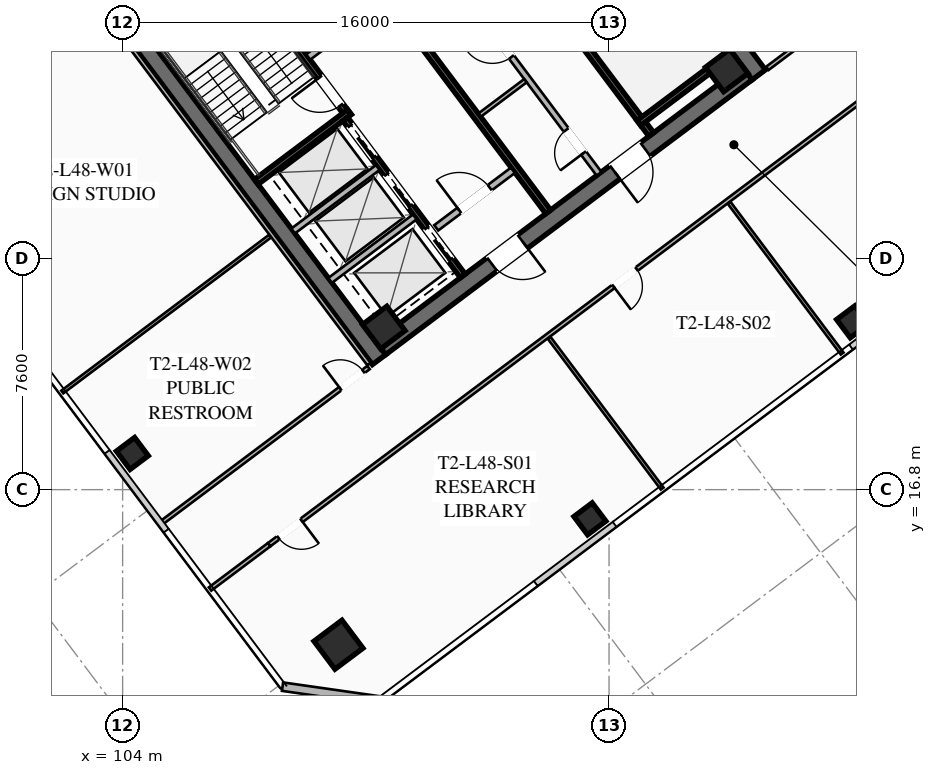
"""IFC4 building model, lengths in metres.
Left out: names, types, materials, properties, quantities, classifications, styles, units other than length and angle.
Written with IfcOpenShell. Run it as: python <this file> out.ifc"""

import sys

from ifc_helpers import new_model, si_unit, direction, frame, frame_2d, origin, origin_2d, place, context, subcontext, project, spatial, rectangle, hollow_rectangle, extrude, element, fill, save


model = new_model("IFC4")
c1 = context("Model", 3, precision=1e-05, world=origin(), true_north=direction((0.0, 1.0)))
c2 = subcontext(c1, "Body", "Model", "MODEL_VIEW")
j1 = project(units=[si_unit("LENGTHUNIT", "METRE"), si_unit("PLANEANGLEUNIT", "RADIAN")], contexts=[c1])
p1 = place(None, origin())
s1 = spatial("IfcSite", under=j1, at=p1, CompositionType="ELEMENT")
p2 = place(p1, origin())
s2 = spatial("IfcBuilding", under=s1, at=p2, CompositionType="ELEMENT")
p3 = place(p2, frame((0.0, 0.0, 178.3)))
s3 = spatial("IfcBuildingStorey", under=s2, at=p3, CompositionType="ELEMENT", Elevation=178.3)
for number, where, z_axis, x_axis in (
    (1, (112.436, 21.077, 0.0), (0.0, 0.0, 1.0), (-0.6, 0.8, 0.0)),
    (2, (115.564, 42.923, 0.0), (0.0, 0.0, 1.0), (0.6, -0.8, 0.0)),
):
    element("IfcWall", number, at=place(p3, frame(where, z_axis=z_axis, x_axis=x_axis)), inside=s3, PredefinedType="SHEAR", context=c2, shape_type="SweptSolid", body=[
        extrude(rectangle(XDim=15.6, YDim=0.55, at=frame_2d((7.8, 0.0))), origin(), (0.0, 0.0, 1.0), 3.55),
    ])
p4 = place(p3, frame((124.539, 30.498, 0.0), z_axis=(0.0, 0.0, 1.0), x_axis=(-0.799998054672, -0.600002593761, 0.0)))
e3 = element("IfcWall", 3, at=p4, inside=s3, PredefinedType="SHEAR", context=c2, shape_type="SweptSolid", body=[
    extrude(rectangle(XDim=15.06, YDim=0.55, at=frame_2d((7.53, 0.0))), origin(), (0.0, 0.0, 1.0), 3.55),
])
p5 = place(p4, frame((9.23, 0.0, 0.0)))
e4 = element("IfcOpeningElement", 4, at=p5, cuts=e3, PredefinedType="OPENING", context=c2, shape_type="SweptSolid", body=[
    extrude(rectangle(XDim=1.25, YDim=2.25, at=frame_2d((0.625, 1.125))), frame((0.0, 0.285, 0.0), z_axis=(0.0, -1.0, 0.0), x_axis=(1.0, 0.0, 0.0)), (0.0, 0.0, 1.0), 0.57),
])
p6 = place(p4, frame((4.18, 0.0, 0.0)))
e5 = element("IfcOpeningElement", 5, at=p6, cuts=e3, PredefinedType="OPENING", context=c2, shape_type="SweptSolid", body=[
    extrude(rectangle(XDim=1.25, YDim=2.25, at=frame_2d((0.625, 1.125))), frame((0.0, 0.285, 0.0), z_axis=(0.0, -1.0, 0.0), x_axis=(1.0, 0.0, 0.0)), (0.0, 0.0, 1.0), 0.57),
])
for number, where, z_axis, x_axis in (
    (6, (112.59, 22.13, 0.0), (0.0, 0.0, 1.0), (0.8, 0.6, 0.0)),
    (7, (123.87, 30.59, 0.0), (0.0, 0.0, 1.0), (0.8, 0.6, 0.0)),
):
    element("IfcColumn", number, at=place(p3, frame(where, z_axis=z_axis, x_axis=x_axis)), inside=s3, PredefinedType="COLUMN", context=c2, shape_type="SweptSolid", body=[
        extrude(hollow_rectangle(XDim=1.0, YDim=1.0, WallThickness=0.04, at=origin_2d()), origin(), (0.0, 0.0, 1.0), 3.37),
    ])
p7 = place(p3, frame((111.1, 11.7, 0.0), z_axis=(0.0, 0.0, 1.0), x_axis=(0.799999996291, 0.600000004945, 0.0)))
e8 = element("IfcColumn", 8, at=p7, inside=s3, PredefinedType="COLUMN", context=c2, shape_type="SweptSolid", body=[
    extrude(hollow_rectangle(XDim=1.15, YDim=1.15, WallThickness=0.045, at=origin_2d()), origin(), (0.0, 0.0, 1.0), 3.37),
])
for number, where, z_axis, x_axis in (
    (9, (119.37, 15.84, 0.0), (0.0, 0.0, 1.0), (0.8, 0.6, 0.0)),
    (10, (128.01, 22.32, 0.0), (0.0, 0.0, 1.0), (0.8, 0.6, 0.0)),
    (11, (104.32, 17.99, 0.0), (0.0, 0.0, 1.0), (0.8, 0.6, 0.0)),
):
    element("IfcColumn", number, at=place(p3, frame(where, z_axis=z_axis, x_axis=x_axis)), inside=s3, PredefinedType="COLUMN", context=c2, shape_type="SweptSolid", body=[
        extrude(hollow_rectangle(XDim=0.75, YDim=0.75, WallThickness=0.032, at=origin_2d()), origin(), (0.0, 0.0, 1.0), 3.37),
    ])
p8 = place(p3, frame((112.48, 9.86, 0.0), z_axis=(0.0, 0.0, 1.0), x_axis=(-0.989950994782, 0.141410847992, 0.0)))
e12 = element("IfcWall", 12, at=p8, inside=s3, PredefinedType="SOLIDWALL", context=c2, shape_type="SweptSolid", body=[
    extrude(rectangle(XDim=3.253, YDim=0.28, at=frame_2d((1.626, 0.0))), origin(), (0.0, 0.0, 1.0), 3.37),
])
p9 = place(p3, frame((111.44, 29.08, 0.0), z_axis=(0.0, 0.0, 1.0), x_axis=(-0.59999029481, 0.8000072788, 0.0)))
e13 = element("IfcWall", 13, at=p9, inside=s3, PredefinedType="SHEAR", context=c2, shape_type="SweptSolid", body=[
    extrude(rectangle(XDim=8.05, YDim=0.2, at=frame_2d((4.025, 0.0))), origin(), (0.0, 0.0, 1.0), 3.37),
])
p10 = place(p9, frame((0.45, 0.0, 0.0)))
e14 = element("IfcOpeningElement", 14, at=p10, cuts=e13, PredefinedType="OPENING", context=c2, shape_type="SweptSolid", body=[
    extrude(rectangle(XDim=1.15, YDim=2.2, at=frame_2d((0.575, 1.1))), frame((0.0, 0.11, 0.0), z_axis=(0.0, -1.0, 0.0), x_axis=(1.0, 0.0, 0.0)), (0.0, 0.0, 1.0), 0.22),
])
p11 = place(p3, frame((108.396, 26.922, 0.0), z_axis=(0.0, 0.0, 1.0), x_axis=(0.800015298837, 0.599979601008, 0.0)))
e15 = element("IfcWall", 15, at=p11, inside=s3, PredefinedType="SHEAR", context=c2, shape_type="SweptSolid", body=[
    extrude(rectangle(XDim=3.83, YDim=0.2, at=frame_2d((1.915, 0.0))), origin(), (0.0, 0.0, 1.0), 3.37),
])
p12 = place(p3, frame((116.56, 34.92, 0.0), z_axis=(0.0, 0.0, 1.0), x_axis=(0.59999029481, -0.8000072788, 0.0)))
e16 = element("IfcWall", 16, at=p12, inside=s3, PredefinedType="SHEAR", context=c2, shape_type="SweptSolid", body=[
    extrude(rectangle(XDim=8.05, YDim=0.2, at=frame_2d((4.025, 0.0))), origin(), (0.0, 0.0, 1.0), 3.37),
])
p13 = place(p12, frame((0.45, 0.0, 0.0)))
e17 = element("IfcOpeningElement", 17, at=p13, cuts=e16, PredefinedType="OPENING", context=c2, shape_type="SweptSolid", body=[
    extrude(rectangle(XDim=1.15, YDim=2.2, at=frame_2d((0.575, 1.1))), frame((0.0, 0.11, 0.0), z_axis=(0.0, -1.0, 0.0), x_axis=(1.0, 0.0, 0.0)), (0.0, 0.0, 1.0), 0.22),
])
p14 = place(p3, frame((120.98, 28.86, 0.0), z_axis=(0.0, 0.0, 1.0), x_axis=(0.800015298837, 0.599979601008, 0.0)))
e18 = element("IfcWall", 18, at=p14, inside=s3, PredefinedType="SHEAR", context=c2, shape_type="SweptSolid", body=[
    extrude(rectangle(XDim=3.83, YDim=0.2, at=frame_2d((1.915, 0.0))), origin(), (0.0, 0.0, 1.0), 3.37),
])
p15 = place(p3, frame((117.998, 25.936, 0.0), z_axis=(0.0, 0.0, 1.0), x_axis=(-0.600002693989, 0.799997979501, 0.0)))
e19 = element("IfcWall", 19, at=p15, inside=s3, PredefinedType="SHEAR", context=c2, shape_type="SweptSolid", body=[
    extrude(rectangle(XDim=14.5, YDim=0.2, at=frame_2d((7.25, 0.0))), origin(), (0.0, 0.0, 1.0), 3.37),
])
p16 = place(p3, frame((110.104, 31.028, 0.0), z_axis=(0.0, 0.0, 1.0), x_axis=(0.800018601094, 0.59997519774, 0.0)))
e20 = element("IfcWall", 20, at=p16, inside=s3, PredefinedType="SOLIDWALL", context=c2, shape_type="SweptSolid", body=[
    extrude(rectangle(XDim=3.15, YDim=0.22, at=frame_2d((1.575, 0.0))), origin(), (0.0, 0.0, 1.0), 2.723),
])
p17 = place(p3, frame((114.316, 25.412, 0.0), z_axis=(0.0, 0.0, 1.0), x_axis=(0.800018601094, 0.59997519774, 0.0)))
e21 = element("IfcWall", 21, at=p17, inside=s3, PredefinedType="SOLIDWALL", context=c2, shape_type="SweptSolid", body=[
    extrude(rectangle(XDim=3.15, YDim=0.22, at=frame_2d((1.575, 0.0))), origin(), (0.0, 0.0, 1.0), 2.723),
])
p18 = place(p17, frame((0.95, 0.0, 0.0)))
e22 = element("IfcOpeningElement", 22, at=p18, cuts=e21, PredefinedType="OPENING", context=c2, shape_type="SweptSolid", body=[
    extrude(rectangle(XDim=1.25, YDim=2.25, at=frame_2d((0.625, 1.125))), frame((0.0, 0.12, 0.0), z_axis=(0.0, -1.0, 0.0), x_axis=(1.0, 0.0, 0.0)), (0.0, 0.0, 1.0), 0.24),
])
p19 = place(p3, frame((115.19, 23.83, 0.0), z_axis=(0.0, 0.0, 1.0), x_axis=(-0.599993943644, 0.800004542231, 0.0)))
e23 = element("IfcWall", 23, at=p19, inside=s3, PredefinedType="SHEAR", context=c2, shape_type="SweptSolid", body=[
    extrude(rectangle(XDim=6.45, YDim=0.2, at=frame_2d((3.225, 0.0))), origin(), (0.0, 0.0, 1.0), 3.37),
])
p20 = place(p19, frame((4.875, 0.0, 0.0)))
e24 = element("IfcOpeningElement", 24, at=p20, cuts=e23, PredefinedType="OPENING", context=c2, shape_type="SweptSolid", body=[
    extrude(rectangle(XDim=1.3, YDim=2.25, at=frame_2d((0.65, 1.125))), frame((0.0, 0.11, 0.0), z_axis=(0.0, -1.0, 0.0), x_axis=(1.0, 0.0, 0.0)), (0.0, 0.0, 1.0), 0.22),
])
p21 = place(p19, frame((2.875, 0.0, 0.0)))
e25 = element("IfcOpeningElement", 25, at=p21, cuts=e23, PredefinedType="OPENING", context=c2, shape_type="SweptSolid", body=[
    extrude(rectangle(XDim=1.3, YDim=2.25, at=frame_2d((0.65, 1.125))), frame((0.0, 0.11, 0.0), z_axis=(0.0, -1.0, 0.0), x_axis=(1.0, 0.0, 0.0)), (0.0, 0.0, 1.0), 0.22),
])
p22 = place(p19, frame((0.675, 0.0, 0.0)))
e26 = element("IfcOpeningElement", 26, at=p22, cuts=e23, PredefinedType="OPENING", context=c2, shape_type="SweptSolid", body=[
    extrude(rectangle(XDim=1.3, YDim=2.25, at=frame_2d((0.65, 1.125))), frame((0.0, 0.11, 0.0), z_axis=(0.0, -1.0, 0.0), x_axis=(1.0, 0.0, 0.0)), (0.0, 0.0, 1.0), 0.22),
])
for number, where, z_axis, x_axis in (
    (27, (110.826, 23.682, 0.0), (0.0, 0.0, 1.0), (0.8, 0.6, 0.0)),
    (28, (109.608, 25.306, 0.0), (0.0, 0.0, 1.0), (0.8, 0.6, 0.0)),
):
    element("IfcWall", number, at=place(p3, frame(where, z_axis=z_axis, x_axis=x_axis)), inside=s3, PredefinedType="SOLIDWALL", context=c2, shape_type="SweptSolid", body=[
        extrude(rectangle(XDim=3.48, YDim=0.2, at=frame_2d((1.74, 0.0))), origin(), (0.0, 0.0, 1.0), 3.37),
    ])
p23 = place(p3, frame((119.67, 27.19, 0.0), z_axis=(0.0, 0.0, 1.0), x_axis=(-0.599988677396, 0.800008491828, 0.0)))
e29 = element("IfcWall", 29, at=p23, inside=s3, PredefinedType="SOLIDWALL", context=c2, shape_type="SweptSolid", body=[
    extrude(rectangle(XDim=6.9, YDim=0.2, at=frame_2d((3.45, 0.0))), origin(), (0.0, 0.0, 1.0), 2.723),
])
p24 = place(p23, frame((0.85, 0.0, 0.0)))
e30 = element("IfcOpeningElement", 30, at=p24, cuts=e29, PredefinedType="OPENING", context=c2, shape_type="SweptSolid", body=[
    extrude(rectangle(XDim=0.95, YDim=2.05, at=frame_2d((0.475, 1.025))), frame((0.0, 0.11, 0.0), z_axis=(0.0, -1.0, 0.0), x_axis=(1.0, 0.0, 0.0)), (0.0, 0.0, 1.0), 0.22),
])
p25 = place(p23, frame((4.8, 0.0, 0.0)))
e31 = element("IfcOpeningElement", 31, at=p25, cuts=e29, PredefinedType="OPENING", context=c2, shape_type="SweptSolid", body=[
    extrude(rectangle(XDim=1.05, YDim=2.2, at=frame_2d((0.525, 1.1))), frame((0.0, 0.11, 0.0), z_axis=(0.0, -1.0, 0.0), x_axis=(1.0, 0.0, 0.0)), (0.0, 0.0, 1.0), 0.22),
])
p26 = place(p3, frame((115.746, 29.122, 0.0), z_axis=(0.0, 0.0, 1.0), x_axis=(0.8, 0.6, 0.0)))
e32 = element("IfcWall", 32, at=p26, inside=s3, PredefinedType="PARTITIONING", context=c2, shape_type="SweptSolid", body=[
    extrude(rectangle(XDim=1.88, YDim=0.135, at=frame_2d((0.94, 0.0))), origin(), (0.0, 0.0, 1.0), 2.723),
])
p27 = place(p3, frame((96.658, 31.206, 0.0), z_axis=(0.0, 0.0, 1.0), x_axis=(0.8, 0.6, 0.0)))
e33 = element("IfcWall", 33, at=p27, inside=s3, PredefinedType="PARTITIONING", context=c2, shape_type="SweptSolid", body=[
    extrude(rectangle(XDim=28.7, YDim=0.135, at=frame_2d((14.35, 0.0))), origin(), (0.0, 0.0, 1.0), 2.723),
])
p28 = place(p27, frame((0.3, 0.0, 0.0)))
e34 = element("IfcOpeningElement", 34, at=p28, cuts=e33, PredefinedType="OPENING", context=c2, shape_type="SweptSolid", body=[
    extrude(rectangle(XDim=0.95, YDim=2.05, at=frame_2d((0.475, 1.025))), frame((0.0, 0.077, 0.0), z_axis=(0.0, -1.0, 0.0), x_axis=(1.0, 0.0, 0.0)), (0.0, 0.0, 1.0), 0.155),
])
p29 = place(p27, frame((9.959, 0.0, 0.0)))
e35 = element("IfcOpeningElement", 35, at=p29, cuts=e33, PredefinedType="OPENING", context=c2, shape_type="SweptSolid", body=[
    extrude(rectangle(XDim=0.95, YDim=2.05, at=frame_2d((0.475, 1.025))), frame((0.0, 0.077, 0.0), z_axis=(0.0, -1.0, 0.0), x_axis=(1.0, 0.0, 0.0)), (0.0, 0.0, 1.0), 0.155),
])
p30 = place(p27, frame((14.005, 0.0, 0.0)))
e36 = element("IfcOpeningElement", 36, at=p30, cuts=e33, PredefinedType="OPENING", context=c2, shape_type="SweptSolid", body=[
    extrude(rectangle(XDim=0.95, YDim=2.05, at=frame_2d((0.475, 1.025))), frame((0.0, 0.077, 0.0), z_axis=(0.0, -1.0, 0.0), x_axis=(1.0, 0.0, 0.0)), (0.0, 0.0, 1.0), 0.155),
])
p31 = place(p27, frame((18.049, 0.0, 0.0)))
e37 = element("IfcOpeningElement", 37, at=p31, cuts=e33, PredefinedType="OPENING", context=c2, shape_type="SweptSolid", body=[
    extrude(rectangle(XDim=0.95, YDim=2.05, at=frame_2d((0.475, 1.025))), frame((0.0, 0.077, 0.0), z_axis=(0.0, -1.0, 0.0), x_axis=(1.0, 0.0, 0.0)), (0.0, 0.0, 1.0), 0.155),
])
p32 = place(p27, frame((27.45, 0.0, 0.0)))
e38 = element("IfcOpeningElement", 38, at=p32, cuts=e33, PredefinedType="OPENING", context=c2, shape_type="SweptSolid", body=[
    extrude(rectangle(XDim=0.95, YDim=2.05, at=frame_2d((0.475, 1.025))), frame((0.0, 0.077, 0.0), z_axis=(0.0, -1.0, 0.0), x_axis=(1.0, 0.0, 0.0)), (0.0, 0.0, 1.0), 0.155),
])
p33 = place(p3, frame((131.78, 32.21, 0.0), z_axis=(0.0, 0.0, 1.0), x_axis=(-0.8, -0.6, 0.0)))
e39 = element("IfcWall", 39, at=p33, inside=s3, PredefinedType="PARTITIONING", context=c2, shape_type="SweptSolid", body=[
    extrude(rectangle(XDim=28.7, YDim=0.135, at=frame_2d((14.35, 0.0))), origin(), (0.0, 0.0, 1.0), 2.723),
])
p34 = place(p33, frame((27.37, 0.0, 0.0)))
e40 = element("IfcOpeningElement", 40, at=p34, cuts=e39, PredefinedType="OPENING", context=c2, shape_type="SweptSolid", body=[
    extrude(rectangle(XDim=0.95, YDim=2.05, at=frame_2d((0.475, 1.025))), frame((0.0, 0.077, 0.0), z_axis=(0.0, -1.0, 0.0), x_axis=(1.0, 0.0, 0.0)), (0.0, 0.0, 1.0), 0.155),
])
p35 = place(p33, frame((13.592, 0.0, 0.0)))
e41 = element("IfcOpeningElement", 41, at=p35, cuts=e39, PredefinedType="OPENING", context=c2, shape_type="SweptSolid", body=[
    extrude(rectangle(XDim=0.95, YDim=2.05, at=frame_2d((0.475, 1.025))), frame((0.0, 0.077, 0.0), z_axis=(0.0, -1.0, 0.0), x_axis=(1.0, 0.0, 0.0)), (0.0, 0.0, 1.0), 0.155),
])
p36 = place(p33, frame((0.38, 0.0, 0.0)))
e42 = element("IfcOpeningElement", 42, at=p36, cuts=e39, PredefinedType="OPENING", context=c2, shape_type="SweptSolid", body=[
    extrude(rectangle(XDim=0.95, YDim=2.05, at=frame_2d((0.475, 1.025))), frame((0.0, 0.077, 0.0), z_axis=(0.0, -1.0, 0.0), x_axis=(1.0, 0.0, 0.0)), (0.0, 0.0, 1.0), 0.155),
])
p37 = place(p3, frame((106.876, 13.532, 0.0), z_axis=(0.0, 0.0, 1.0), x_axis=(0.800012055778, 0.599983925293, 0.0)))
e43 = element("IfcWall", 43, at=p37, inside=s3, PredefinedType="PARTITIONING", context=c2, shape_type="SweptSolid", body=[
    extrude(rectangle(XDim=2.43, YDim=0.135, at=frame_2d((1.215, 0.0))), origin(), (0.0, 0.0, 1.0), 2.723),
])
p38 = place(p3, frame((121.748, 16.836, 0.0), z_axis=(0.0, 0.0, 1.0), x_axis=(-0.6, 0.8, 0.0)))
e44 = element("IfcWall", 44, at=p38, inside=s3, PredefinedType="PARTITIONING", context=c2, shape_type="SweptSolid", body=[
    extrude(rectangle(XDim=6.2, YDim=0.11, at=frame_2d((3.1, 0.0))), origin(), (0.0, 0.0, 1.0), 2.723),
])
p39 = place(p3, frame((127.668, 21.276, 0.0), z_axis=(0.0, 0.0, 1.0), x_axis=(-0.599981099069, 0.800014175349, 0.0)))
e45 = element("IfcWall", 45, at=p39, inside=s3, PredefinedType="PARTITIONING", context=c2, shape_type="SweptSolid", body=[
    extrude(rectangle(XDim=6.2, YDim=0.11, at=frame_2d((3.1, 0.0))), origin(), (0.0, 0.0, 1.0), 2.723),
])
p40 = place(p3, frame((125.208, 30.656, 0.0), z_axis=(0.0, 0.0, 1.0), x_axis=(0.800006797429, 0.599990936654, 0.0)))
e46 = element("IfcWall", 46, at=p40, inside=s3, PredefinedType="PARTITIONING", context=c2, shape_type="SweptSolid", body=[
    extrude(rectangle(XDim=8.62, YDim=0.135, at=frame_2d((4.31, 0.0))), origin(), (0.0, 0.0, 1.0), 2.723),
])
p41 = place(p40, frame((2.045, 0.0, 0.0)))
e47 = element("IfcOpeningElement", 47, at=p41, cuts=e46, PredefinedType="OPENING", context=c2, shape_type="SweptSolid", body=[
    extrude(rectangle(XDim=0.95, YDim=2.05, at=frame_2d((0.475, 1.025))), frame((0.0, 0.077, 0.0), z_axis=(0.0, -1.0, 0.0), x_axis=(1.0, 0.0, 0.0)), (0.0, 0.0, 1.0), 0.155),
])
p42 = place(p3, frame((112.104, 20.928, 0.0), z_axis=(0.0, 0.0, 1.0), x_axis=(-0.599994940075, 0.800003794918, 0.0)))
e48 = element("IfcWall", 48, at=p42, inside=s3, PredefinedType="PARTITIONING", context=c2, shape_type="SweptSolid", body=[
    extrude(rectangle(XDim=15.44, YDim=0.135, at=frame_2d((7.72, 0.0))), origin(), (0.0, 0.0, 1.0), 2.723),
])
p43 = place(p3, frame((102.728, 33.296, 0.0), z_axis=(0.0, 0.0, 1.0), x_axis=(-0.800013722153, -0.59998170336, 0.0)))
e49 = element("IfcWall", 49, at=p43, inside=s3, PredefinedType="PARTITIONING", context=c2, shape_type="SweptSolid", body=[
    extrude(rectangle(XDim=8.54, YDim=0.135, at=frame_2d((4.27, 0.0))), origin(), (0.0, 0.0, 1.0), 2.723),
])
p44 = place(p43, frame((0.5, 0.0, 0.0)))
e50 = element("IfcOpeningElement", 50, at=p44, cuts=e49, PredefinedType="OPENING", context=c2, shape_type="SweptSolid", body=[
    extrude(rectangle(XDim=0.95, YDim=2.05, at=frame_2d((0.475, 1.025))), frame((0.0, 0.077, 0.0), z_axis=(0.0, -1.0, 0.0), x_axis=(1.0, 0.0, 0.0)), (0.0, 0.0, 1.0), 0.155),
])
p45 = place(p3, frame((105.256, 15.692, 0.0), z_axis=(0.0, 0.0, 1.0), x_axis=(0.799989708052, 0.600013722352, 0.0)))
e51 = element("IfcWall", 51, at=p45, inside=s3, PredefinedType="PARTITIONING", context=c2, shape_type="SweptSolid", body=[
    extrude(rectangle(XDim=8.54, YDim=0.135, at=frame_2d((4.27, 0.0))), origin(), (0.0, 0.0, 1.0), 2.723),
])
p46 = place(p45, frame((7.38, 0.0, 0.0)))
e52 = element("IfcOpeningElement", 52, at=p46, cuts=e51, PredefinedType="OPENING", context=c2, shape_type="SweptSolid", body=[
    extrude(rectangle(XDim=0.95, YDim=2.05, at=frame_2d((0.475, 1.025))), frame((0.0, 0.077, 0.0), z_axis=(0.0, -1.0, 0.0), x_axis=(1.0, 0.0, 0.0)), (0.0, 0.0, 1.0), 0.155),
])
p47 = place(p3, frame((102.016, 20.012, 0.0), z_axis=(0.0, 0.0, 1.0), x_axis=(0.799989708052, 0.600013722352, 0.0)))
e53 = element("IfcWall", 53, at=p47, inside=s3, PredefinedType="PARTITIONING", context=c2, shape_type="SweptSolid", body=[
    extrude(rectangle(XDim=8.54, YDim=0.11, at=frame_2d((4.27, 0.0))), origin(), (0.0, 0.0, 1.0), 2.723),
])
p48 = place(p5, origin())
e54 = element("IfcDoor", 54, at=p48, inside=s3, OperationType="SINGLE_SWING_LEFT", PredefinedType="DOOR", context=c2, shape_type="SweptSolid", body=[
    extrude(rectangle(XDim=1.25, YDim=2.25, at=frame_2d((0.625, 1.125))), frame((0.0, 0.025, 0.0), z_axis=(0.0, -1.0, 0.0), x_axis=(1.0, 0.0, 0.0)), (0.0, 0.0, 1.0), 0.05),
])
fill(e4, e54)
p49 = place(p6, origin())
e55 = element("IfcDoor", 55, at=p49, inside=s3, OperationType="SINGLE_SWING_RIGHT", PredefinedType="DOOR", context=c2, shape_type="SweptSolid", body=[
    extrude(rectangle(XDim=1.25, YDim=2.25, at=frame_2d((0.625, 1.125))), frame((0.0, 0.025, 0.0), z_axis=(0.0, -1.0, 0.0), x_axis=(1.0, 0.0, 0.0)), (0.0, 0.0, 1.0), 0.05),
])
fill(e5, e55)
p50 = place(p10, origin())
e56 = element("IfcDoor", 56, at=p50, inside=s3, OperationType="SINGLE_SWING_RIGHT", PredefinedType="DOOR", context=c2, shape_type="SweptSolid", body=[
    extrude(rectangle(XDim=1.15, YDim=2.2, at=frame_2d((0.575, 1.1))), frame((0.0, 0.025, 0.0), z_axis=(0.0, -1.0, 0.0), x_axis=(1.0, 0.0, 0.0)), (0.0, 0.0, 1.0), 0.05),
])
fill(e14, e56)
p51 = place(p18, origin())
e57 = element("IfcDoor", 57, at=p51, inside=s3, OperationType="SINGLE_SWING_LEFT", PredefinedType="DOOR", context=c2, shape_type="SweptSolid", body=[
    extrude(rectangle(XDim=1.25, YDim=2.25, at=frame_2d((0.625, 1.125))), frame((0.0, 0.025, 0.0), z_axis=(0.0, -1.0, 0.0), x_axis=(1.0, 0.0, 0.0)), (0.0, 0.0, 1.0), 0.05),
])
fill(e22, e57)
p52 = place(p24, origin())
e58 = element("IfcDoor", 58, at=p52, inside=s3, OperationType="SINGLE_SWING_LEFT", PredefinedType="DOOR", context=c2, shape_type="SweptSolid", body=[
    extrude(rectangle(XDim=0.95, YDim=2.05, at=frame_2d((0.475, 1.025))), frame((0.0, 0.025, 0.0), z_axis=(0.0, -1.0, 0.0), x_axis=(1.0, 0.0, 0.0)), (0.0, 0.0, 1.0), 0.05),
])
fill(e30, e58)
p53 = place(p25, origin())
e59 = element("IfcDoor", 59, at=p53, inside=s3, OperationType="SINGLE_SWING_RIGHT", PredefinedType="DOOR", context=c2, shape_type="SweptSolid", body=[
    extrude(rectangle(XDim=1.05, YDim=2.2, at=frame_2d((0.525, 1.1))), frame((0.0, 0.025, 0.0), z_axis=(0.0, -1.0, 0.0), x_axis=(1.0, 0.0, 0.0)), (0.0, 0.0, 1.0), 0.05),
])
fill(e31, e59)
p54 = place(p34, origin())
e60 = element("IfcDoor", 60, at=p54, inside=s3, OperationType="SINGLE_SWING_LEFT", PredefinedType="DOOR", context=c2, shape_type="SweptSolid", body=[
    extrude(rectangle(XDim=0.95, YDim=2.05, at=frame_2d((0.475, 1.025))), frame((0.0, 0.025, 0.0), z_axis=(0.0, -1.0, 0.0), x_axis=(1.0, 0.0, 0.0)), (0.0, 0.0, 1.0), 0.05),
])
fill(e40, e60)
p55 = place(p35, origin())
e61 = element("IfcDoor", 61, at=p55, inside=s3, OperationType="SINGLE_SWING_RIGHT", PredefinedType="DOOR", context=c2, shape_type="SweptSolid", body=[
    extrude(rectangle(XDim=0.95, YDim=2.05, at=frame_2d((0.475, 1.025))), frame((0.0, 0.025, 0.0), z_axis=(0.0, -1.0, 0.0), x_axis=(1.0, 0.0, 0.0)), (0.0, 0.0, 1.0), 0.05),
])
fill(e41, e61)
p56 = place(p46, origin())
e62 = element("IfcDoor", 62, at=p56, inside=s3, OperationType="SINGLE_SWING_LEFT", PredefinedType="DOOR", context=c2, shape_type="SweptSolid", body=[
    extrude(rectangle(XDim=0.95, YDim=2.05, at=frame_2d((0.475, 1.025))), frame((0.0, 0.025, 0.0), z_axis=(0.0, -1.0, 0.0), x_axis=(1.0, 0.0, 0.0)), (0.0, 0.0, 1.0), 0.05),
])
fill(e52, e62)
p57 = place(p20, origin())
e63 = element("IfcDoor", 63, at=p57, inside=s3, OperationType="SLIDING_TO_LEFT", PredefinedType="DOOR", context=c2, shape_type="SweptSolid", body=[
    extrude(rectangle(XDim=1.3, YDim=2.25, at=frame_2d((0.65, 1.125))), frame((0.0, 0.025, 0.0), z_axis=(0.0, -1.0, 0.0), x_axis=(1.0, 0.0, 0.0)), (0.0, 0.0, 1.0), 0.05),
])
fill(e24, e63)
p58 = place(p21, origin())
e64 = element("IfcDoor", 64, at=p58, inside=s3, OperationType="SLIDING_TO_LEFT", PredefinedType="DOOR", context=c2, shape_type="SweptSolid", body=[
    extrude(rectangle(XDim=1.3, YDim=2.25, at=frame_2d((0.65, 1.125))), frame((0.0, 0.025, 0.0), z_axis=(0.0, -1.0, 0.0), x_axis=(1.0, 0.0, 0.0)), (0.0, 0.0, 1.0), 0.05),
])
fill(e25, e64)
p59 = place(p22, origin())
e65 = element("IfcDoor", 65, at=p59, inside=s3, OperationType="SLIDING_TO_LEFT", PredefinedType="DOOR", context=c2, shape_type="SweptSolid", body=[
    extrude(rectangle(XDim=1.3, YDim=2.25, at=frame_2d((0.65, 1.125))), frame((0.0, 0.025, 0.0), z_axis=(0.0, -1.0, 0.0), x_axis=(1.0, 0.0, 0.0)), (0.0, 0.0, 1.0), 0.05),
])
fill(e26, e65)
save(model, sys.argv[1])
